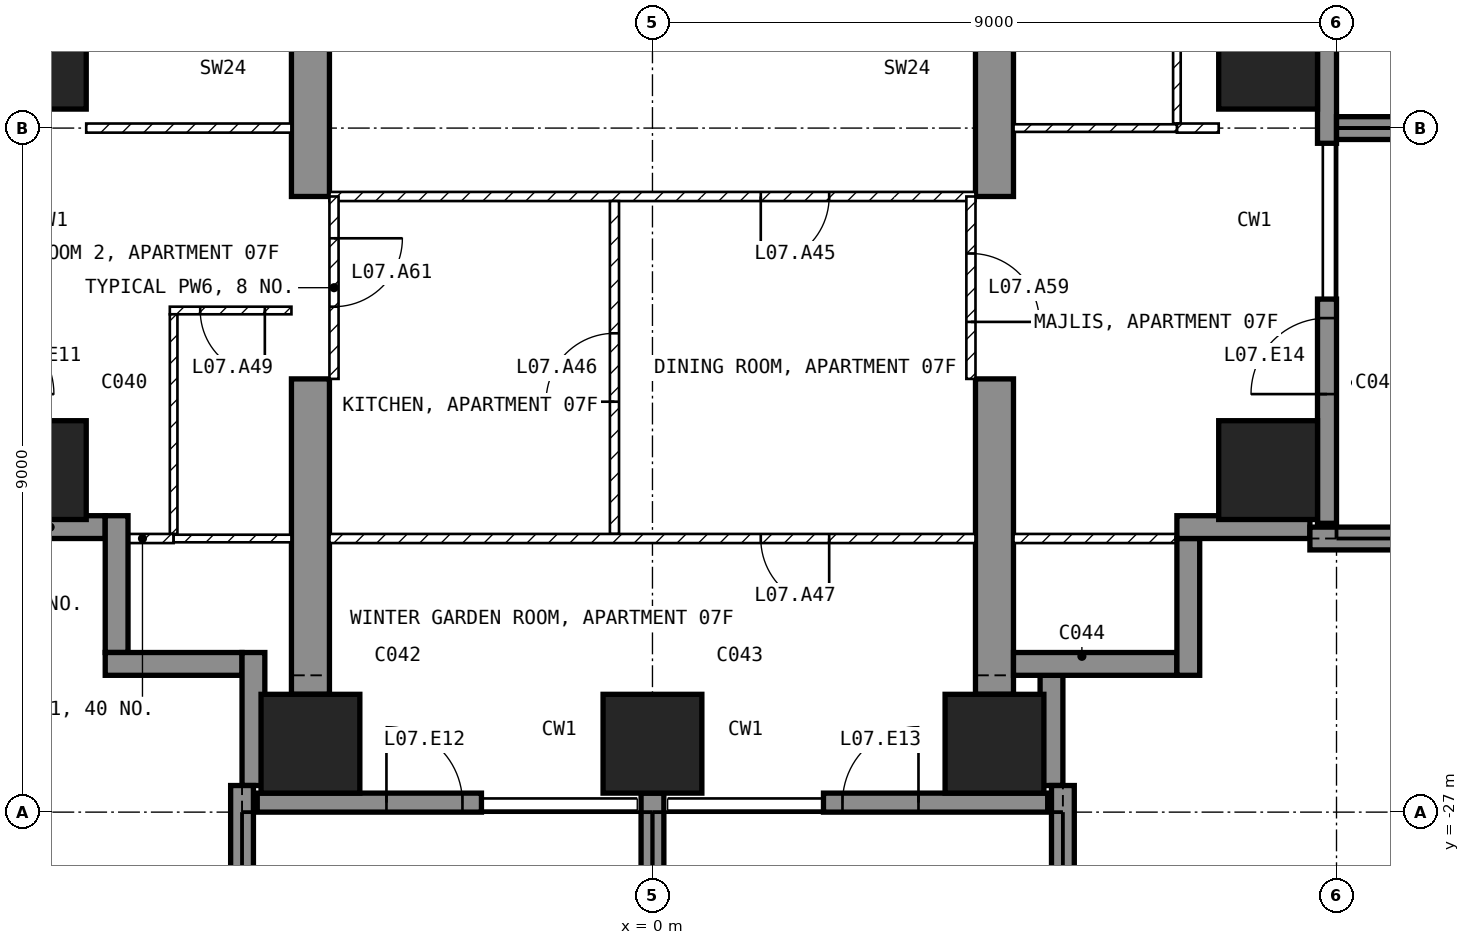
"""IFC4 building model, lengths in metres.
Left out: names, types, materials, properties, quantities, classifications, styles, units other than length and angle.
Written with IfcOpenShell. Run it as: python <this file> out.ifc"""

import sys

from ifc_helpers import new_model, si_unit, direction, frame, frame_2d, origin, origin_2d, place, context, subcontext, project, spatial, polyline, rectangle, outline, extrude, element, fill, save


model = new_model("IFC4")
c1 = context("Model", 3, precision=1e-05, world=origin(), true_north=direction((0.0, 1.0)))
c2 = subcontext(c1, "Body", "Model", "MODEL_VIEW")
j1 = project(units=[si_unit("LENGTHUNIT", "METRE"), si_unit("PLANEANGLEUNIT", "RADIAN")], contexts=[c1])
p1 = place(None, origin())
s1 = spatial("IfcSite", under=j1, at=p1, CompositionType="ELEMENT")
p2 = place(p1, origin())
s2 = spatial("IfcBuilding", under=s1, at=p2, CompositionType="ELEMENT")
p3 = place(p2, frame((0.0, 0.0, 43.5)))
s3 = spatial("IfcBuildingStorey", under=s2, at=p3, CompositionType="ELEMENT", Elevation=43.5)
for number, where, z_axis, x_axis in (
    (1, (-8.1, -22.5, -0.25), (0.0, 0.0, 1.0), (1.0, 0.0, 0.0)),
    (2, (-8.1, -17.1, -0.25), (0.0, 0.0, 1.0), (1.0, 0.0, 0.0)),
    (3, (-4.5, -26.1, -0.25), (0.0, 0.0, 1.0), (1.0, 0.0, 0.0)),
    (4, (0.0, -26.1, -0.25), (0.0, 0.0, 1.0), (1.0, 0.0, 0.0)),
    (5, (4.5, -26.1, -0.25), (0.0, 0.0, 1.0), (1.0, 0.0, 0.0)),
    (6, (8.1, -22.5, -0.25), (0.0, 0.0, 1.0), (1.0, 0.0, 0.0)),
    (7, (8.1, -17.1, -0.25), (0.0, 0.0, 1.0), (1.0, 0.0, 0.0)),
):
    element("IfcColumn", number, at=place(p3, frame(where, z_axis=z_axis, x_axis=x_axis)), inside=s3, PredefinedType="COLUMN", context=c2, shape_type="SweptSolid", body=[
        extrude(rectangle(XDim=1.3, YDim=1.3, at=origin_2d()), origin(), (0.0, 0.0, 1.0), 3.5),
    ])
for number, where, z_axis, x_axis in (
    (8, (-4.75, -25.45, -0.25), (1.0, 0.0, 0.0), (0.0, 1.0, 0.0)),
    (9, (4.25, -25.45, -0.25), (1.0, 0.0, 0.0), (0.0, 1.0, 0.0)),
):
    element("IfcWall", number, at=place(p3, frame(where, z_axis=z_axis, x_axis=x_axis)), inside=s3, PredefinedType="SHEAR", context=c2, shape_type="SweptSolid", body=[
        extrude(outline(polyline([(0.0, 0.0), (4.15, 0.0), (4.15, 2.65), (6.55, 2.65), (6.55, 0.0), (11.95, 0.0), (11.95, 2.65), (14.35, 2.65), (14.35, 0.0), (16.45, 0.0), (16.45, 3.5), (0.0, 3.5), (0.0, 0.0)])), origin(), (0.0, 0.0, 1.0), 0.5),
    ])
p4 = place(p3, frame((-5.2, -26.875, 0.0), z_axis=(0.0, 0.0, 1.0), x_axis=(1.0, 0.0, 0.0)))
e10 = element("IfcWall", 10, at=p4, inside=s3, PredefinedType="SOLIDWALL", context=c2, shape_type="SweptSolid", body=[
    extrude(rectangle(XDim=2.95, YDim=0.25, at=frame_2d((1.475, 0.0))), origin(), (0.0, 0.0, 1.0), 3.25),
])
p5 = place(p4, frame((1.7, 0.0, 0.0)))
e11 = element("IfcOpeningElement", 11, at=p5, cuts=e10, PredefinedType="OPENING", context=c2, shape_type="SweptSolid", body=[
    extrude(rectangle(XDim=1.0, YDim=2.4, at=frame_2d((0.5, 1.2))), frame((0.0, 0.135, 0.0), z_axis=(0.0, -1.0, 0.0), x_axis=(1.0, 0.0, 0.0)), (0.0, 0.0, 1.0), 0.27),
])
p6 = place(p3, frame((2.25, -26.875, 0.0), z_axis=(0.0, 0.0, 1.0), x_axis=(1.0, 0.0, 0.0)))
e12 = element("IfcWall", 12, at=p6, inside=s3, PredefinedType="SOLIDWALL", context=c2, shape_type="SweptSolid", body=[
    extrude(rectangle(XDim=2.95, YDim=0.25, at=frame_2d((1.475, 0.0))), origin(), (0.0, 0.0, 1.0), 3.25),
])
p7 = place(p6, frame((0.25, 0.0, 0.0)))
e13 = element("IfcOpeningElement", 13, at=p7, cuts=e12, PredefinedType="OPENING", context=c2, shape_type="SweptSolid", body=[
    extrude(rectangle(XDim=1.0, YDim=2.4, at=frame_2d((0.5, 1.2))), frame((0.0, 0.135, 0.0), z_axis=(0.0, -1.0, 0.0), x_axis=(1.0, 0.0, 0.0)), (0.0, 0.0, 1.0), 0.27),
])
p8 = place(p3, frame((8.875, -23.2, 0.0), z_axis=(0.0, 0.0, 1.0), x_axis=(0.0, 1.0, 0.0)))
e14 = element("IfcWall", 14, at=p8, inside=s3, PredefinedType="SOLIDWALL", context=c2, shape_type="SweptSolid", body=[
    extrude(rectangle(XDim=2.95, YDim=0.25, at=frame_2d((1.475, 0.0))), origin(), (0.0, 0.0, 1.0), 3.25),
])
p9 = place(p8, frame((1.7, 0.0, 0.0)))
e15 = element("IfcOpeningElement", 15, at=p9, cuts=e14, PredefinedType="OPENING", context=c2, shape_type="SweptSolid", body=[
    extrude(rectangle(XDim=1.0, YDim=2.4, at=frame_2d((0.5, 1.2))), frame((0.0, 0.135, 0.0), z_axis=(0.0, -1.0, 0.0), x_axis=(1.0, 0.0, 0.0)), (0.0, 0.0, 1.0), 0.27),
])
p10 = place(p3, frame((8.875, -18.2, 0.0), z_axis=(0.0, 0.0, 1.0), x_axis=(0.0, 1.0, 0.0)))
e16 = element("IfcWall", 16, at=p10, inside=s3, PredefinedType="SOLIDWALL", context=c2, shape_type="SweptSolid", body=[
    extrude(rectangle(XDim=3.55, YDim=0.25, at=frame_2d((1.775, 0.0))), origin(), (0.0, 0.0, 1.0), 3.25),
])
p11 = place(p10, frame((2.1, 0.0, 0.0)))
e17 = element("IfcOpeningElement", 17, at=p11, cuts=e16, PredefinedType="OPENING", context=c2, shape_type="SweptSolid", body=[
    extrude(rectangle(XDim=1.2, YDim=2.4, at=frame_2d((0.6, 1.2))), frame((0.0, 0.135, 0.0), z_axis=(0.0, -1.0, 0.0), x_axis=(1.0, 0.0, 0.0)), (0.0, 0.0, 1.0), 0.27),
])
p12 = place(p3, frame((5.25, -26.65, 0.0), z_axis=(0.0, 0.0, 1.0), x_axis=(0.0, 1.0, 0.0)))
e18 = element("IfcWall", 18, at=p12, inside=s3, PredefinedType="SOLIDWALL", context=c2, shape_type="SweptSolid", body=[
    extrude(rectangle(XDim=1.45, YDim=0.3, at=frame_2d((0.725, 0.0))), origin(), (0.0, 0.0, 1.0), 3.25),
])
p13 = place(p3, frame((4.75, -25.05, 0.0), z_axis=(0.0, 0.0, 1.0), x_axis=(1.0, 0.0, 0.0)))
e19 = element("IfcWall", 19, at=p13, inside=s3, PredefinedType="SOLIDWALL", context=c2, shape_type="SweptSolid", body=[
    extrude(rectangle(XDim=2.15, YDim=0.3, at=frame_2d((1.075, 0.0))), origin(), (0.0, 0.0, 1.0), 3.25),
])
p14 = place(p3, frame((7.05, -25.2, 0.0), z_axis=(0.0, 0.0, 1.0), x_axis=(0.0, 1.0, 0.0)))
e20 = element("IfcWall", 20, at=p14, inside=s3, PredefinedType="SOLIDWALL", context=c2, shape_type="SweptSolid", body=[
    extrude(rectangle(XDim=1.8, YDim=0.3, at=frame_2d((0.9, 0.0))), origin(), (0.0, 0.0, 1.0), 3.25),
])
p15 = place(p3, frame((6.9, -23.25, 0.0), z_axis=(0.0, 0.0, 1.0), x_axis=(1.0, 0.0, 0.0)))
e21 = element("IfcWall", 21, at=p15, inside=s3, PredefinedType="SOLIDWALL", context=c2, shape_type="SweptSolid", body=[
    extrude(rectangle(XDim=1.75, YDim=0.3, at=frame_2d((0.875, 0.0))), origin(), (0.0, 0.0, 1.0), 3.25),
])
p16 = place(p3, frame((-8.65, -23.25, 0.0), z_axis=(0.0, 0.0, 1.0), x_axis=(1.0, 0.0, 0.0)))
e22 = element("IfcWall", 22, at=p16, inside=s3, PredefinedType="SOLIDWALL", context=c2, shape_type="SweptSolid", body=[
    extrude(rectangle(XDim=1.45, YDim=0.3, at=frame_2d((0.725, 0.0))), origin(), (0.0, 0.0, 1.0), 3.25),
])
p17 = place(p3, frame((-7.05, -23.1, 0.0), z_axis=(0.0, 0.0, 1.0), x_axis=(0.0, -1.0, 0.0)))
e23 = element("IfcWall", 23, at=p17, inside=s3, PredefinedType="SOLIDWALL", context=c2, shape_type="SweptSolid", body=[
    extrude(rectangle(XDim=1.8, YDim=0.3, at=frame_2d((0.9, 0.0))), origin(), (0.0, 0.0, 1.0), 3.25),
])
p18 = place(p3, frame((-7.2, -25.05, 0.0), z_axis=(0.0, 0.0, 1.0), x_axis=(1.0, 0.0, 0.0)))
e24 = element("IfcWall", 24, at=p18, inside=s3, PredefinedType="SOLIDWALL", context=c2, shape_type="SweptSolid", body=[
    extrude(rectangle(XDim=1.8, YDim=0.3, at=frame_2d((0.9, 0.0))), origin(), (0.0, 0.0, 1.0), 3.25),
])
p19 = place(p3, frame((-5.25, -24.9, 0.0), z_axis=(0.0, 0.0, 1.0), x_axis=(0.0, -1.0, 0.0)))
e25 = element("IfcWall", 25, at=p19, inside=s3, PredefinedType="SOLIDWALL", context=c2, shape_type="SweptSolid", body=[
    extrude(rectangle(XDim=1.75, YDim=0.3, at=frame_2d((0.875, 0.0))), origin(), (0.0, 0.0, 1.0), 3.25),
])
p20 = place(p3, frame((-5.4, -26.65, 0.0), z_axis=(0.0, 0.0, 1.0), x_axis=(0.0, -1.0, 0.0)))
e26 = element("IfcWall", 26, at=p20, inside=s3, PredefinedType="SOLIDWALL", context=c2, shape_type="SweptSolid", body=[
    extrude(rectangle(XDim=3.05, YDim=0.3, at=frame_2d((1.525, 0.0))), origin(), (0.0, 0.0, 1.0), 3.25),
])
p21 = place(p3, frame((0.0, -26.75, 0.0), z_axis=(0.0, 0.0, 1.0), x_axis=(0.0, -1.0, 0.0)))
e27 = element("IfcWall", 27, at=p21, inside=s3, PredefinedType="SOLIDWALL", context=c2, shape_type="SweptSolid", body=[
    extrude(rectangle(XDim=2.95, YDim=0.3, at=frame_2d((1.475, 0.0))), origin(), (0.0, 0.0, 1.0), 3.25),
])
for number, where, z_axis, x_axis in (
    (28, (5.4, -26.65, 0.0), (0.0, 0.0, 1.0), (0.0, -1.0, 0.0)),
    (29, (8.65, -23.4, 0.0), (0.0, 0.0, 1.0), (1.0, 0.0, 0.0)),
):
    element("IfcWall", number, at=place(p3, frame(where, z_axis=z_axis, x_axis=x_axis)), inside=s3, PredefinedType="SOLIDWALL", context=c2, shape_type="SweptSolid", body=[
        extrude(rectangle(XDim=3.05, YDim=0.3, at=frame_2d((1.525, 0.0))), origin(), (0.0, 0.0, 1.0), 3.25),
    ])
p22 = place(p3, frame((9.0, -18.0, 0.0), z_axis=(0.0, 0.0, 1.0), x_axis=(1.0, 0.0, 0.0)))
e30 = element("IfcWall", 30, at=p22, inside=s3, PredefinedType="SOLIDWALL", context=c2, shape_type="SweptSolid", body=[
    extrude(rectangle(XDim=2.7, YDim=0.3, at=frame_2d((1.35, 0.0))), origin(), (0.0, 0.0, 1.0), 3.25),
])
p23 = place(p3, frame((4.25, -18.9, 0.0), z_axis=(0.0, 0.0, 1.0), x_axis=(-1.0, 0.0, 0.0)))
e31 = element("IfcWall", 31, at=p23, inside=s3, PredefinedType="PARTITIONING", context=c2, shape_type="SweptSolid", body=[
    extrude(rectangle(XDim=8.5, YDim=0.12, at=frame_2d((4.25, 0.0))), origin(), (0.0, 0.0, 1.0), 3.25),
])
p24 = place(p23, frame((1.925, 0.0, 0.0)))
e32 = element("IfcOpeningElement", 32, at=p24, cuts=e31, PredefinedType="OPENING", context=c2, shape_type="SweptSolid", body=[
    extrude(rectangle(XDim=0.9, YDim=2.1, at=frame_2d((0.45, 1.05))), frame((0.0, 0.07, 0.0), z_axis=(0.0, -1.0, 0.0), x_axis=(1.0, 0.0, 0.0)), (0.0, 0.0, 1.0), 0.14),
])
p25 = place(p3, frame((-0.5, -23.34, 0.0), z_axis=(0.0, 0.0, 1.0), x_axis=(0.0, 1.0, 0.0)))
e33 = element("IfcWall", 33, at=p25, inside=s3, PredefinedType="PARTITIONING", context=c2, shape_type="SweptSolid", body=[
    extrude(rectangle(XDim=4.38, YDim=0.12, at=frame_2d((2.19, 0.0))), origin(), (0.0, 0.0, 1.0), 3.25),
])
p26 = place(p25, frame((1.74, 0.0, 0.0)))
e34 = element("IfcOpeningElement", 34, at=p26, cuts=e33, PredefinedType="OPENING", context=c2, shape_type="SweptSolid", body=[
    extrude(rectangle(XDim=0.9, YDim=2.1, at=frame_2d((0.45, 1.05))), frame((0.0, 0.07, 0.0), z_axis=(0.0, -1.0, 0.0), x_axis=(1.0, 0.0, 0.0)), (0.0, 0.0, 1.0), 0.14),
])
p27 = place(p3, frame((4.25, -23.4, 0.0), z_axis=(0.0, 0.0, 1.0), x_axis=(-1.0, 0.0, 0.0)))
e35 = element("IfcWall", 35, at=p27, inside=s3, PredefinedType="PARTITIONING", context=c2, shape_type="SweptSolid", body=[
    extrude(rectangle(XDim=8.5, YDim=0.12, at=frame_2d((4.25, 0.0))), origin(), (0.0, 0.0, 1.0), 3.25),
])
p28 = place(p27, frame((1.925, 0.0, 0.0)))
e36 = element("IfcOpeningElement", 36, at=p28, cuts=e35, PredefinedType="OPENING", context=c2, shape_type="SweptSolid", body=[
    extrude(rectangle(XDim=0.9, YDim=2.1, at=frame_2d((0.45, 1.05))), frame((0.0, 0.07, 0.0), z_axis=(0.0, -1.0, 0.0), x_axis=(1.0, 0.0, 0.0)), (0.0, 0.0, 1.0), 0.14),
])
p29 = place(p3, frame((6.9, -17.94, 0.0), z_axis=(0.0, 0.0, 1.0), x_axis=(0.0, 1.0, 0.0)))
e37 = element("IfcWall", 37, at=p29, inside=s3, PredefinedType="PARTITIONING", context=c2, shape_type="SweptSolid", body=[
    extrude(rectangle(XDim=3.49, YDim=0.1, at=frame_2d((1.745, 0.0))), origin(), (0.0, 0.0, 1.0), 3.25),
])
p30 = place(p3, frame((7.45, -18.0, 0.0), z_axis=(0.0, 0.0, 1.0), x_axis=(-1.0, 0.0, 0.0)))
e38 = element("IfcWall", 38, at=p30, inside=s3, PredefinedType="PARTITIONING", context=c2, shape_type="SweptSolid", body=[
    extrude(rectangle(XDim=0.55, YDim=0.12, at=frame_2d((0.275, 0.0))), origin(), (0.0, 0.0, 1.0), 3.25),
])
p31 = place(p3, frame((6.9, -18.0, 0.0), z_axis=(0.0, 0.0, 1.0), x_axis=(-1.0, 0.0, 0.0)))
e39 = element("IfcWall", 39, at=p31, inside=s3, PredefinedType="PARTITIONING", context=c2, shape_type="SweptSolid", body=[
    extrude(rectangle(XDim=2.15, YDim=0.1, at=frame_2d((1.075, 0.0))), origin(), (0.0, 0.0, 1.0), 3.25),
])
p32 = place(p3, frame((7.12, -23.4, 0.0), z_axis=(0.0, 0.0, 1.0), x_axis=(-1.0, 0.0, 0.0)))
e40 = element("IfcWall", 40, at=p32, inside=s3, PredefinedType="PARTITIONING", context=c2, shape_type="SweptSolid", body=[
    extrude(rectangle(XDim=2.37, YDim=0.12, at=frame_2d((1.185, 0.0))), origin(), (0.0, 0.0, 1.0), 3.25),
])
p33 = place(p3, frame((-4.75, -18.0, 0.0), z_axis=(0.0, 0.0, 1.0), x_axis=(-1.0, 0.0, 0.0)))
e41 = element("IfcWall", 41, at=p33, inside=s3, PredefinedType="PARTITIONING", context=c2, shape_type="SweptSolid", body=[
    extrude(rectangle(XDim=2.7, YDim=0.12, at=frame_2d((1.35, 0.0))), origin(), (0.0, 0.0, 1.0), 3.25),
])
p34 = place(p3, frame((-4.75, -20.4, 0.0), z_axis=(0.0, 0.0, 1.0), x_axis=(-1.0, 0.0, 0.0)))
e42 = element("IfcWall", 42, at=p34, inside=s3, PredefinedType="PARTITIONING", context=c2, shape_type="SweptSolid", body=[
    extrude(rectangle(XDim=1.6, YDim=0.1, at=frame_2d((0.8, 0.0))), origin(), (0.0, 0.0, 1.0), 3.25),
])
p35 = place(p34, frame((0.35, 0.0, 0.0)))
e43 = element("IfcOpeningElement", 43, at=p35, cuts=e42, PredefinedType="OPENING", context=c2, shape_type="SweptSolid", body=[
    extrude(rectangle(XDim=0.85, YDim=2.1, at=frame_2d((0.425, 1.05))), frame((0.0, 0.06, 0.0), z_axis=(0.0, -1.0, 0.0), x_axis=(1.0, 0.0, 0.0)), (0.0, 0.0, 1.0), 0.12),
])
p36 = place(p3, frame((-6.3, -20.45, 0.0), z_axis=(0.0, 0.0, 1.0), x_axis=(0.0, -1.0, 0.0)))
e44 = element("IfcWall", 44, at=p36, inside=s3, PredefinedType="PARTITIONING", context=c2, shape_type="SweptSolid", body=[
    extrude(rectangle(XDim=2.89, YDim=0.1, at=frame_2d((1.445, 0.0))), origin(), (0.0, 0.0, 1.0), 3.25),
])
p37 = place(p3, frame((-6.3, -23.4, 0.0), z_axis=(0.0, 0.0, 1.0), x_axis=(-1.0, 0.0, 0.0)))
e45 = element("IfcWall", 45, at=p37, inside=s3, PredefinedType="PARTITIONING", context=c2, shape_type="SweptSolid", body=[
    extrude(rectangle(XDim=0.82, YDim=0.12, at=frame_2d((0.41, 0.0))), origin(), (0.0, 0.0, 1.0), 3.25),
])
p38 = place(p3, frame((-4.75, -23.4, 0.0), z_axis=(0.0, 0.0, 1.0), x_axis=(-1.0, 0.0, 0.0)))
e46 = element("IfcWall", 46, at=p38, inside=s3, PredefinedType="PARTITIONING", context=c2, shape_type="SweptSolid", body=[
    extrude(rectangle(XDim=1.55, YDim=0.1, at=frame_2d((0.775, 0.0))), origin(), (0.0, 0.0, 1.0), 3.25),
])
p39 = place(p3, frame((4.19, -18.9, 0.0), z_axis=(0.0, 0.0, 1.0), x_axis=(0.0, -1.0, 0.0)))
e47 = element("IfcWall", 47, at=p39, inside=s3, PredefinedType="PARTITIONING", context=c2, shape_type="SweptSolid", body=[
    extrude(rectangle(XDim=2.4, YDim=0.12, at=frame_2d((1.2, 0.0))), origin(), (0.0, 0.0, 1.0), 2.4),
])
p40 = place(p39, frame((0.75, 0.0, 0.0)))
e48 = element("IfcOpeningElement", 48, at=p40, cuts=e47, PredefinedType="OPENING", context=c2, shape_type="SweptSolid", body=[
    extrude(rectangle(XDim=0.9, YDim=2.1, at=frame_2d((0.45, 1.05))), frame((0.0, 0.07, 0.0), z_axis=(0.0, -1.0, 0.0), x_axis=(1.0, 0.0, 0.0)), (0.0, 0.0, 1.0), 0.14),
])
p41 = place(p3, frame((-4.19, -18.9, 0.0), z_axis=(0.0, 0.0, 1.0), x_axis=(0.0, -1.0, 0.0)))
e49 = element("IfcWall", 49, at=p41, inside=s3, PredefinedType="PARTITIONING", context=c2, shape_type="SweptSolid", body=[
    extrude(rectangle(XDim=2.4, YDim=0.12, at=frame_2d((1.2, 0.0))), origin(), (0.0, 0.0, 1.0), 2.4),
])
p42 = place(p41, frame((0.55, 0.0, 0.0)))
e50 = element("IfcOpeningElement", 50, at=p42, cuts=e49, PredefinedType="OPENING", context=c2, shape_type="SweptSolid", body=[
    extrude(rectangle(XDim=0.9, YDim=2.1, at=frame_2d((0.45, 1.05))), frame((0.0, 0.07, 0.0), z_axis=(0.0, -1.0, 0.0), x_axis=(1.0, 0.0, 0.0)), (0.0, 0.0, 1.0), 0.14),
])
p43 = place(p5, origin())
e51 = element("IfcDoor", 51, at=p43, inside=s3, OperationType="SINGLE_SWING_LEFT", PredefinedType="DOOR", context=c2, shape_type="SweptSolid", body=[
    extrude(rectangle(XDim=1.0, YDim=2.4, at=frame_2d((0.5, 1.2))), frame((0.0, 0.025, 0.0), z_axis=(0.0, -1.0, 0.0), x_axis=(1.0, 0.0, 0.0)), (0.0, 0.0, 1.0), 0.05),
])
fill(e11, e51)
p44 = place(p7, origin())
e52 = element("IfcDoor", 52, at=p44, inside=s3, OperationType="SINGLE_SWING_RIGHT", PredefinedType="DOOR", context=c2, shape_type="SweptSolid", body=[
    extrude(rectangle(XDim=1.0, YDim=2.4, at=frame_2d((0.5, 1.2))), frame((0.0, 0.025, 0.0), z_axis=(0.0, -1.0, 0.0), x_axis=(1.0, 0.0, 0.0)), (0.0, 0.0, 1.0), 0.05),
])
fill(e13, e52)
p45 = place(p9, origin())
e53 = element("IfcDoor", 53, at=p45, inside=s3, OperationType="SINGLE_SWING_LEFT", PredefinedType="DOOR", context=c2, shape_type="SweptSolid", body=[
    extrude(rectangle(XDim=1.0, YDim=2.4, at=frame_2d((0.5, 1.2))), frame((0.0, 0.025, 0.0), z_axis=(0.0, -1.0, 0.0), x_axis=(1.0, 0.0, 0.0)), (0.0, 0.0, 1.0), 0.05),
])
fill(e15, e53)
p46 = place(p24, origin())
e54 = element("IfcDoor", 54, at=p46, inside=s3, OperationType="SINGLE_SWING_RIGHT", PredefinedType="DOOR", context=c2, shape_type="SweptSolid", body=[
    extrude(rectangle(XDim=0.9, YDim=2.1, at=frame_2d((0.45, 1.05))), frame((0.0, 0.025, 0.0), z_axis=(0.0, -1.0, 0.0), x_axis=(1.0, 0.0, 0.0)), (0.0, 0.0, 1.0), 0.05),
])
fill(e32, e54)
p47 = place(p26, origin())
e55 = element("IfcDoor", 55, at=p47, inside=s3, OperationType="SINGLE_SWING_LEFT", PredefinedType="DOOR", context=c2, shape_type="SweptSolid", body=[
    extrude(rectangle(XDim=0.9, YDim=2.1, at=frame_2d((0.45, 1.05))), frame((0.0, 0.025, 0.0), z_axis=(0.0, -1.0, 0.0), x_axis=(1.0, 0.0, 0.0)), (0.0, 0.0, 1.0), 0.05),
])
fill(e34, e55)
p48 = place(p28, origin())
e56 = element("IfcDoor", 56, at=p48, inside=s3, OperationType="SINGLE_SWING_LEFT", PredefinedType="DOOR", context=c2, shape_type="SweptSolid", body=[
    extrude(rectangle(XDim=0.9, YDim=2.1, at=frame_2d((0.45, 1.05))), frame((0.0, 0.025, 0.0), z_axis=(0.0, -1.0, 0.0), x_axis=(1.0, 0.0, 0.0)), (0.0, 0.0, 1.0), 0.05),
])
fill(e36, e56)
p49 = place(p35, origin())
e57 = element("IfcDoor", 57, at=p49, inside=s3, OperationType="SINGLE_SWING_LEFT", PredefinedType="DOOR", context=c2, shape_type="SweptSolid", body=[
    extrude(rectangle(XDim=0.85, YDim=2.1, at=frame_2d((0.425, 1.05))), frame((0.0, 0.025, 0.0), z_axis=(0.0, -1.0, 0.0), x_axis=(1.0, 0.0, 0.0)), (0.0, 0.0, 1.0), 0.05),
])
fill(e43, e57)
p50 = place(p40, origin())
e58 = element("IfcDoor", 58, at=p50, inside=s3, OperationType="SINGLE_SWING_RIGHT", PredefinedType="DOOR", context=c2, shape_type="SweptSolid", body=[
    extrude(rectangle(XDim=0.9, YDim=2.1, at=frame_2d((0.45, 1.05))), frame((0.0, 0.025, 0.0), z_axis=(0.0, -1.0, 0.0), x_axis=(1.0, 0.0, 0.0)), (0.0, 0.0, 1.0), 0.05),
])
fill(e48, e58)
p51 = place(p42, origin())
e59 = element("IfcDoor", 59, at=p51, inside=s3, OperationType="SINGLE_SWING_LEFT", PredefinedType="DOOR", context=c2, shape_type="SweptSolid", body=[
    extrude(rectangle(XDim=0.9, YDim=2.1, at=frame_2d((0.45, 1.05))), frame((0.0, 0.025, 0.0), z_axis=(0.0, -1.0, 0.0), x_axis=(1.0, 0.0, 0.0)), (0.0, 0.0, 1.0), 0.05),
])
fill(e50, e59)
save(model, sys.argv[1])
